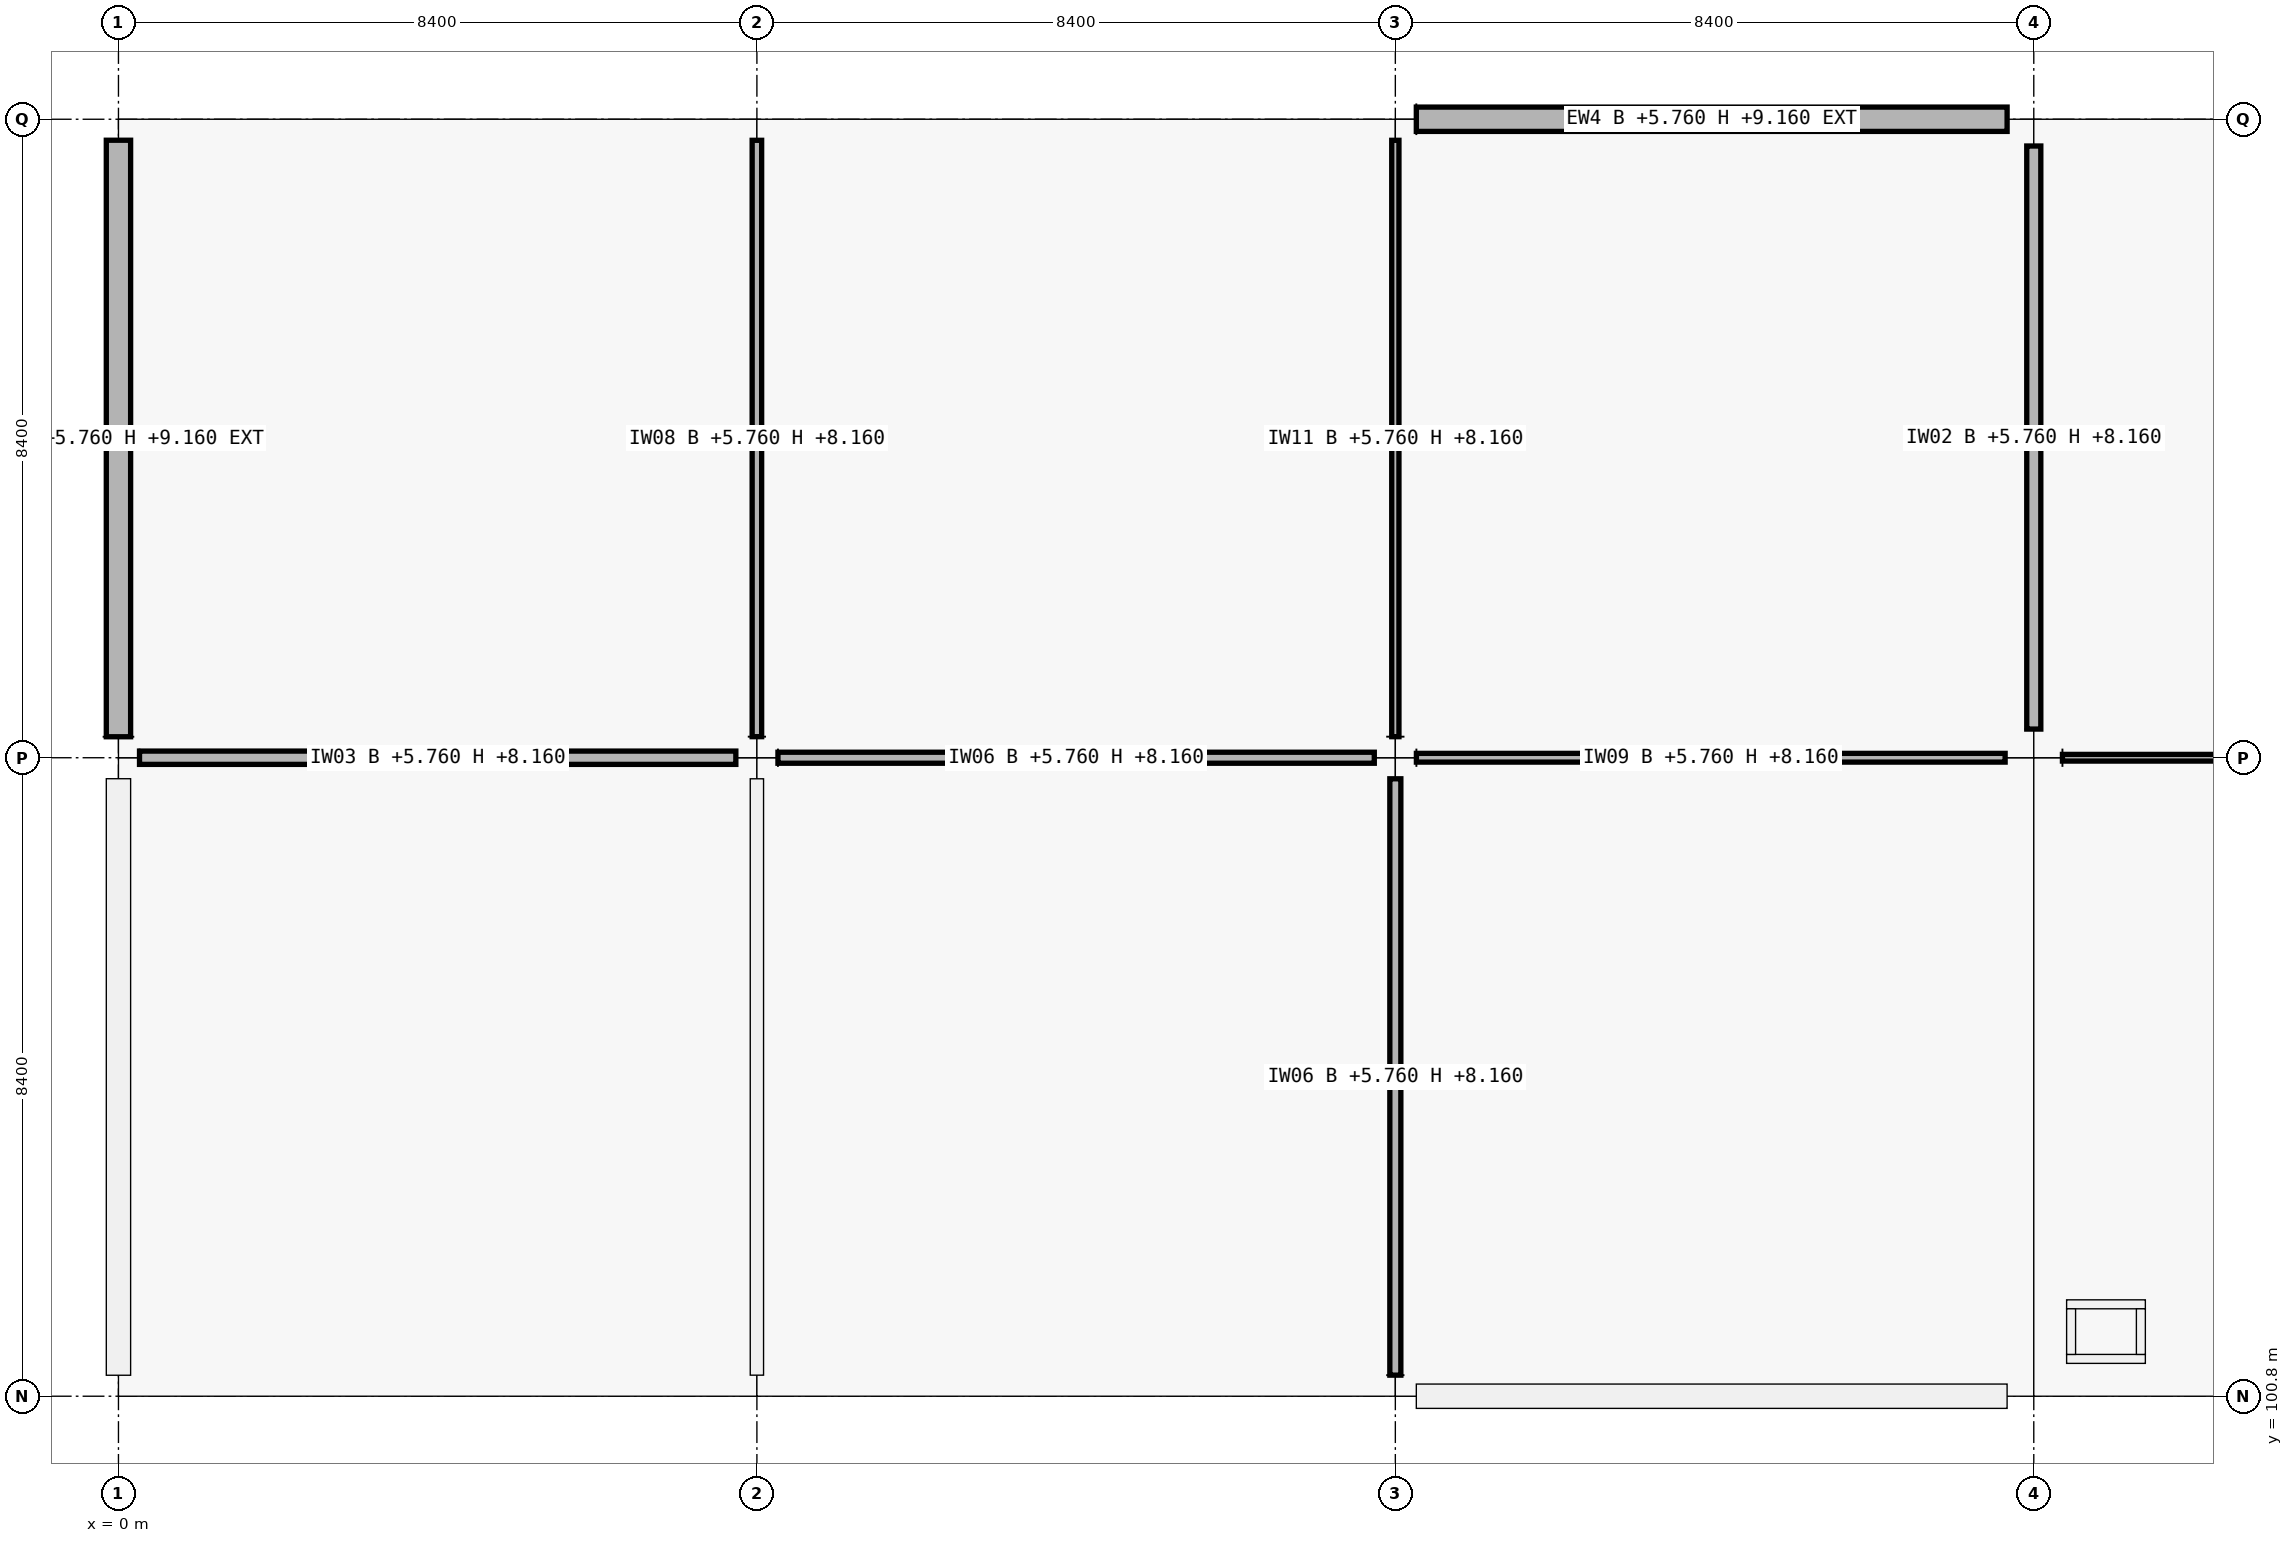
"""IFC4 building model, lengths in metres.
Left out: names, types, materials, properties, quantities, classifications, styles, units other than length and angle.
Written with IfcOpenShell. Run it as: python <this file> out.ifc"""

import sys

from ifc_helpers import new_model, si_unit, direction, frame, frame_2d, origin, origin_2d, place, context, subcontext, project, spatial, rectangle, extrude, element, fill, save


model = new_model("IFC4")
c1 = context("Model", 3, precision=1e-05, world=origin(), true_north=direction((0.0, 1.0)))
c2 = subcontext(c1, "Body", "Model", "MODEL_VIEW")
j1 = project(units=[si_unit("LENGTHUNIT", "METRE"), si_unit("PLANEANGLEUNIT", "RADIAN")], contexts=[c1])
p1 = place(None, origin())
s1 = spatial("IfcSite", under=j1, at=p1, CompositionType="ELEMENT")
p2 = place(p1, origin())
s2 = spatial("IfcBuilding", under=s1, at=p2, CompositionType="ELEMENT")
p3 = place(p2, frame((0.0, 0.0, 5.76)))
s3 = spatial("IfcBuildingStorey", under=s2, at=p3, CompositionType="ELEMENT", Elevation=5.76)
for number, where, z_axis, x_axis in (
    (1, (0.0, 100.8, 0.0), (0.0, 0.0, 1.0), (1.0, 0.0, 0.0)),
    (2, (0.0, 109.2, 0.0), (0.0, 0.0, 1.0), (1.0, 0.0, 0.0)),
    (3, (0.0, 117.6, 0.0), (0.0, 0.0, 1.0), (1.0, 0.0, 0.0)),
    (4, (8.4, 100.8, 0.0), (0.0, 0.0, 1.0), (1.0, 0.0, 0.0)),
    (5, (8.4, 109.2, 0.0), (0.0, 0.0, 1.0), (1.0, 0.0, 0.0)),
    (6, (8.4, 117.6, 0.0), (0.0, 0.0, 1.0), (1.0, 0.0, 0.0)),
    (7, (16.8, 100.8, 0.0), (0.0, 0.0, 1.0), (1.0, 0.0, 0.0)),
    (8, (16.8, 109.2, 0.0), (0.0, 0.0, 1.0), (1.0, 0.0, 0.0)),
    (9, (16.8, 117.6, 0.0), (0.0, 0.0, 1.0), (1.0, 0.0, 0.0)),
):
    element("IfcColumn", number, at=place(p3, frame(where, z_axis=z_axis, x_axis=x_axis)), inside=s3, PredefinedType="COLUMN", context=c2, shape_type="SweptSolid", body=[
        extrude(rectangle(XDim=0.55, YDim=0.55, at=origin_2d()), origin(), (0.0, 0.0, 1.0), 4.2),
    ])
p4 = place(p3, frame((25.2, 100.8, 0.0), z_axis=(0.0, 0.0, 1.0), x_axis=(1.0, 0.0, 0.0)))
e10 = element("IfcColumn", 10, at=p4, inside=s3, PredefinedType="COLUMN", context=c2, shape_type="SweptSolid", body=[
    extrude(rectangle(XDim=0.7, YDim=0.7, at=origin_2d()), origin(), (0.0, 0.0, 1.0), 4.5),
])
p5 = place(p3, frame((25.2, 109.2, 0.0), z_axis=(0.0, 0.0, 1.0), x_axis=(1.0, 0.0, 0.0)))
e11 = element("IfcColumn", 11, at=p5, inside=s3, PredefinedType="COLUMN", context=c2, shape_type="SweptSolid", body=[
    extrude(rectangle(XDim=0.75, YDim=0.75, at=origin_2d()), origin(), (0.0, 0.0, 1.0), 4.5),
])
p6 = place(p3, frame((25.2, 117.6, 0.0), z_axis=(0.0, 0.0, 1.0), x_axis=(1.0, 0.0, 0.0)))
e12 = element("IfcColumn", 12, at=p6, inside=s3, PredefinedType="COLUMN", context=c2, shape_type="SweptSolid", body=[
    extrude(rectangle(XDim=0.7, YDim=0.7, at=origin_2d()), origin(), (0.0, 0.0, 1.0), 4.5),
])
p7 = place(p3, frame((0.0, 101.076, 0.0), z_axis=(0.0, 0.0, 1.0), x_axis=(0.0, 1.0, 0.0)))
e13 = element("IfcWall", 13, at=p7, inside=s3, PredefinedType="SOLIDWALL", context=c2, shape_type="SweptSolid", body=[
    extrude(rectangle(XDim=7.848, YDim=0.32, at=frame_2d((3.924, 0.0))), origin(), (0.0, 0.0, 1.0), 3.4),
])
p8 = place(p7, frame((3.124, 0.0, 0.9)))
e14 = element("IfcOpeningElement", 14, at=p8, cuts=e13, PredefinedType="OPENING", context=c2, shape_type="SweptSolid", body=[
    extrude(rectangle(XDim=1.6, YDim=2.25, at=frame_2d((0.8, 1.125))), frame((0.0, 0.16, 0.0), z_axis=(0.0, -1.0, 0.0), x_axis=(1.0, 0.0, 0.0)), (0.0, 0.0, 1.0), 0.32),
])
p9 = place(p3, frame((0.0, 109.476, 0.0), z_axis=(0.0, 0.0, 1.0), x_axis=(0.0, 1.0, 0.0)))
e15 = element("IfcWall", 15, at=p9, inside=s3, PredefinedType="SOLIDWALL", context=c2, shape_type="SweptSolid", body=[
    extrude(rectangle(XDim=7.848, YDim=0.32, at=frame_2d((3.924, 0.0))), origin(), (0.0, 0.0, 1.0), 3.4),
])
p10 = place(p3, frame((24.849, 100.8, 0.0), z_axis=(0.0, 0.0, 1.0), x_axis=(-1.0, 0.0, 0.0)))
e16 = element("IfcWall", 16, at=p10, inside=s3, PredefinedType="SOLIDWALL", context=c2, shape_type="SweptSolid", body=[
    extrude(rectangle(XDim=7.773, YDim=0.32, at=frame_2d((3.887, 0.0))), origin(), (0.0, 0.0, 1.0), 3.4),
])
p11 = place(p10, frame((3.436, 0.0, 0.9)))
e17 = element("IfcOpeningElement", 17, at=p11, cuts=e16, PredefinedType="OPENING", context=c2, shape_type="SweptSolid", body=[
    extrude(rectangle(XDim=0.9, YDim=1.5, at=frame_2d((0.45, 0.75))), frame((0.0, 0.16, 0.0), z_axis=(0.0, -1.0, 0.0), x_axis=(1.0, 0.0, 0.0)), (0.0, 0.0, 1.0), 0.32),
])
p12 = place(p3, frame((17.076, 117.6, 0.0), z_axis=(0.0, 0.0, 1.0), x_axis=(1.0, 0.0, 0.0)))
e18 = element("IfcWall", 18, at=p12, inside=s3, PredefinedType="SOLIDWALL", context=c2, shape_type="SweptSolid", body=[
    extrude(rectangle(XDim=7.773, YDim=0.32, at=frame_2d((3.887, 0.0))), origin(), (0.0, 0.0, 1.0), 3.4),
])
p13 = place(p12, frame((3.036, 0.0, 0.9)))
e19 = element("IfcOpeningElement", 19, at=p13, cuts=e18, PredefinedType="OPENING", context=c2, shape_type="SweptSolid", body=[
    extrude(rectangle(XDim=1.7, YDim=1.85, at=frame_2d((0.85, 0.925))), frame((0.0, 0.16, 0.0), z_axis=(0.0, -1.0, 0.0), x_axis=(1.0, 0.0, 0.0)), (0.0, 0.0, 1.0), 0.32),
])
for number, where, z_axis, x_axis in (
    (20, (25.632, 101.291, 0.0), (0.0, 0.0, 1.0), (1.0, 0.0, 0.0)),
    (21, (25.632, 102.009, 0.0), (0.0, 0.0, 1.0), (1.0, 0.0, 0.0)),
):
    element("IfcWall", number, at=place(p3, frame(where, z_axis=z_axis, x_axis=x_axis)), inside=s3, PredefinedType="PARTITIONING", context=c2, shape_type="SweptSolid", body=[
        extrude(rectangle(XDim=1.036, YDim=0.118, at=frame_2d((0.518, 0.0))), origin(), (0.0, 0.0, 1.0), 3.48),
    ])
for number, where, z_axis, x_axis in (
    (22, (25.691, 101.35, 0.0), (0.0, 0.0, 1.0), (0.0, 1.0, 0.0)),
    (23, (26.609, 101.35, 0.0), (0.0, 0.0, 1.0), (0.0, 1.0, 0.0)),
):
    element("IfcWall", number, at=place(p3, frame(where, z_axis=z_axis, x_axis=x_axis)), inside=s3, PredefinedType="PARTITIONING", context=c2, shape_type="SweptSolid", body=[
        extrude(rectangle(XDim=0.6, YDim=0.118, at=frame_2d((0.3, 0.0))), origin(), (0.0, 0.0, 1.0), 3.48),
    ])
p14 = place(p3, frame((0.277, 109.2, 0.0), z_axis=(0.0, 0.0, 1.0), x_axis=(1.0, 0.0, 0.0)))
e24 = element("IfcWall", 24, at=p14, inside=s3, PredefinedType="PARTITIONING", context=c2, shape_type="SweptSolid", body=[
    extrude(rectangle(XDim=7.846, YDim=0.175, at=frame_2d((3.923, 0.0))), origin(), (0.0, 0.0, 1.0), 2.4),
])
p15 = place(p14, frame((3.443, 0.0, 0.0)))
e25 = element("IfcOpeningElement", 25, at=p15, cuts=e24, PredefinedType="OPENING", context=c2, shape_type="SweptSolid", body=[
    extrude(rectangle(XDim=0.96, YDim=2.18, at=frame_2d((0.48, 1.09))), frame((0.0, 0.087, 0.0), z_axis=(0.0, -1.0, 0.0), x_axis=(1.0, 0.0, 0.0)), (0.0, 0.0, 1.0), 0.175),
])
p16 = place(p3, frame((8.677, 109.2, 0.0), z_axis=(0.0, 0.0, 1.0), x_axis=(1.0, 0.0, 0.0)))
e26 = element("IfcWall", 26, at=p16, inside=s3, PredefinedType="PARTITIONING", context=c2, shape_type="SweptSolid", body=[
    extrude(rectangle(XDim=7.846, YDim=0.145, at=frame_2d((3.923, 0.0))), origin(), (0.0, 0.0, 1.0), 2.4),
])
p17 = place(p16, frame((3.463, 0.0, 0.0)))
e27 = element("IfcOpeningElement", 27, at=p17, cuts=e26, PredefinedType="OPENING", context=c2, shape_type="SweptSolid", body=[
    extrude(rectangle(XDim=0.92, YDim=2.15, at=frame_2d((0.46, 1.075))), frame((0.0, 0.073, 0.0), z_axis=(0.0, -1.0, 0.0), x_axis=(1.0, 0.0, 0.0)), (0.0, 0.0, 1.0), 0.145),
])
p18 = place(p3, frame((17.077, 109.2, 0.0), z_axis=(0.0, 0.0, 1.0), x_axis=(1.0, 0.0, 0.0)))
e28 = element("IfcWall", 28, at=p18, inside=s3, PredefinedType="PARTITIONING", context=c2, shape_type="SweptSolid", body=[
    extrude(rectangle(XDim=7.746, YDim=0.115, at=frame_2d((3.873, 0.0))), origin(), (0.0, 0.0, 1.0), 2.4),
])
p19 = place(p18, frame((3.368, 0.0, 0.0)))
e29 = element("IfcOpeningElement", 29, at=p19, cuts=e28, PredefinedType="OPENING", context=c2, shape_type="SweptSolid", body=[
    extrude(rectangle(XDim=1.01, YDim=2.12, at=frame_2d((0.505, 1.06))), frame((0.0, 0.058, 0.0), z_axis=(0.0, -1.0, 0.0), x_axis=(1.0, 0.0, 0.0)), (0.0, 0.0, 1.0), 0.115),
])
p20 = place(p3, frame((25.577, 109.2, 0.0), z_axis=(0.0, 0.0, 1.0), x_axis=(1.0, 0.0, 0.0)))
e30 = element("IfcWall", 30, at=p20, inside=s3, PredefinedType="PARTITIONING", context=c2, shape_type="SweptSolid", body=[
    extrude(rectangle(XDim=7.671, YDim=0.088, at=frame_2d((3.835, 0.0))), origin(), (0.0, 0.0, 1.0), 2.4),
])
p21 = place(p20, frame((3.351, 0.0, 0.0)))
e31 = element("IfcOpeningElement", 31, at=p21, cuts=e30, PredefinedType="OPENING", context=c2, shape_type="SweptSolid", body=[
    extrude(rectangle(XDim=0.97, YDim=2.12, at=frame_2d((0.485, 1.06))), frame((0.0, 0.044, 0.0), z_axis=(0.0, -1.0, 0.0), x_axis=(1.0, 0.0, 0.0)), (0.0, 0.0, 1.0), 0.088),
])
p22 = place(p3, frame((8.4, 101.077, 0.0), z_axis=(0.0, 0.0, 1.0), x_axis=(0.0, 1.0, 0.0)))
e32 = element("IfcWall", 32, at=p22, inside=s3, PredefinedType="PARTITIONING", context=c2, shape_type="SweptSolid", body=[
    extrude(rectangle(XDim=7.846, YDim=0.175, at=frame_2d((3.923, 0.0))), origin(), (0.0, 0.0, 1.0), 2.4),
])
p23 = place(p22, frame((3.433, 0.0, 0.0)))
e33 = element("IfcOpeningElement", 33, at=p23, cuts=e32, PredefinedType="OPENING", context=c2, shape_type="SweptSolid", body=[
    extrude(rectangle(XDim=0.98, YDim=2.18, at=frame_2d((0.49, 1.09))), frame((0.0, 0.087, 0.0), z_axis=(0.0, -1.0, 0.0), x_axis=(1.0, 0.0, 0.0)), (0.0, 0.0, 1.0), 0.175),
])
p24 = place(p3, frame((8.4, 109.477, 0.0), z_axis=(0.0, 0.0, 1.0), x_axis=(0.0, 1.0, 0.0)))
e34 = element("IfcWall", 34, at=p24, inside=s3, PredefinedType="PARTITIONING", context=c2, shape_type="SweptSolid", body=[
    extrude(rectangle(XDim=7.846, YDim=0.125, at=frame_2d((3.923, 0.0))), origin(), (0.0, 0.0, 1.0), 2.4),
])
p25 = place(p24, frame((3.453, 0.0, 0.0)))
e35 = element("IfcOpeningElement", 35, at=p25, cuts=e34, PredefinedType="OPENING", context=c2, shape_type="SweptSolid", body=[
    extrude(rectangle(XDim=0.94, YDim=2.15, at=frame_2d((0.47, 1.075))), frame((0.0, 0.062, 0.0), z_axis=(0.0, -1.0, 0.0), x_axis=(1.0, 0.0, 0.0)), (0.0, 0.0, 1.0), 0.125),
])
p26 = place(p3, frame((16.8, 101.077, 0.0), z_axis=(0.0, 0.0, 1.0), x_axis=(0.0, 1.0, 0.0)))
e36 = element("IfcWall", 36, at=p26, inside=s3, PredefinedType="PARTITIONING", context=c2, shape_type="SweptSolid", body=[
    extrude(rectangle(XDim=7.846, YDim=0.145, at=frame_2d((3.923, 0.0))), origin(), (0.0, 0.0, 1.0), 2.4),
])
p27 = place(p26, frame((3.383, 0.0, 0.0)))
e37 = element("IfcOpeningElement", 37, at=p27, cuts=e36, PredefinedType="OPENING", context=c2, shape_type="SweptSolid", body=[
    extrude(rectangle(XDim=1.08, YDim=2.22, at=frame_2d((0.54, 1.11))), frame((0.0, 0.073, 0.0), z_axis=(0.0, -1.0, 0.0), x_axis=(1.0, 0.0, 0.0)), (0.0, 0.0, 1.0), 0.145),
])
p28 = place(p3, frame((16.8, 109.477, 0.0), z_axis=(0.0, 0.0, 1.0), x_axis=(0.0, 1.0, 0.0)))
e38 = element("IfcWall", 38, at=p28, inside=s3, PredefinedType="PARTITIONING", context=c2, shape_type="SweptSolid", body=[
    extrude(rectangle(XDim=7.846, YDim=0.095, at=frame_2d((3.923, 0.0))), origin(), (0.0, 0.0, 1.0), 2.4),
])
p29 = place(p28, frame((3.458, 0.0, 0.0)))
e39 = element("IfcOpeningElement", 39, at=p29, cuts=e38, PredefinedType="OPENING", context=c2, shape_type="SweptSolid", body=[
    extrude(rectangle(XDim=0.93, YDim=2.12, at=frame_2d((0.465, 1.06))), frame((0.0, 0.047, 0.0), z_axis=(0.0, -1.0, 0.0), x_axis=(1.0, 0.0, 0.0)), (0.0, 0.0, 1.0), 0.095),
])
p30 = place(p3, frame((25.2, 109.577, 0.0), z_axis=(0.0, 0.0, 1.0), x_axis=(0.0, 1.0, 0.0)))
e40 = element("IfcWall", 40, at=p30, inside=s3, PredefinedType="PARTITIONING", context=c2, shape_type="SweptSolid", body=[
    extrude(rectangle(XDim=7.671, YDim=0.185, at=frame_2d((3.835, 0.0))), origin(), (0.0, 0.0, 1.0), 2.4),
])
p31 = place(p30, frame((3.336, 0.0, 0.0)))
e41 = element("IfcOpeningElement", 41, at=p31, cuts=e40, PredefinedType="OPENING", context=c2, shape_type="SweptSolid", body=[
    extrude(rectangle(XDim=1.0, YDim=2.2, at=frame_2d((0.5, 1.1))), frame((0.0, 0.093, 0.0), z_axis=(0.0, -1.0, 0.0), x_axis=(1.0, 0.0, 0.0)), (0.0, 0.0, 1.0), 0.185),
])
p32 = place(p8, origin())
e42 = element("IfcWindow", 42, at=p32, inside=s3, PartitioningType="SINGLE_PANEL", PredefinedType="WINDOW", context=c2, shape_type="SweptSolid", body=[
    extrude(rectangle(XDim=1.6, YDim=2.25, at=frame_2d((0.8, 1.125))), frame((0.0, 0.03, 0.0), z_axis=(0.0, -1.0, 0.0), x_axis=(1.0, 0.0, 0.0)), (0.0, 0.0, 1.0), 0.06),
])
fill(e14, e42)
p33 = place(p11, origin())
e43 = element("IfcWindow", 43, at=p33, inside=s3, PartitioningType="SINGLE_PANEL", PredefinedType="WINDOW", context=c2, shape_type="SweptSolid", body=[
    extrude(rectangle(XDim=0.9, YDim=1.5, at=frame_2d((0.45, 0.75))), frame((0.0, 0.03, 0.0), z_axis=(0.0, -1.0, 0.0), x_axis=(1.0, 0.0, 0.0)), (0.0, 0.0, 1.0), 0.06),
])
fill(e17, e43)
p34 = place(p13, origin())
e44 = element("IfcWindow", 44, at=p34, inside=s3, PartitioningType="SINGLE_PANEL", PredefinedType="WINDOW", context=c2, shape_type="SweptSolid", body=[
    extrude(rectangle(XDim=1.7, YDim=1.85, at=frame_2d((0.85, 0.925))), frame((0.0, 0.03, 0.0), z_axis=(0.0, -1.0, 0.0), x_axis=(1.0, 0.0, 0.0)), (0.0, 0.0, 1.0), 0.06),
])
fill(e19, e44)
p35 = place(p19, origin())
e45 = element("IfcDoor", 45, at=p35, inside=s3, OperationType="SINGLE_SWING_RIGHT", PredefinedType="DOOR", context=c2, shape_type="SweptSolid", body=[
    extrude(rectangle(XDim=1.01, YDim=2.12, at=frame_2d((0.505, 1.06))), frame((0.0, 0.025, 0.0), z_axis=(0.0, -1.0, 0.0), x_axis=(1.0, 0.0, 0.0)), (0.0, 0.0, 1.0), 0.05),
])
fill(e29, e45)
p36 = place(p27, origin())
e46 = element("IfcDoor", 46, at=p36, inside=s3, OperationType="SINGLE_SWING_RIGHT", PredefinedType="DOOR", context=c2, shape_type="SweptSolid", body=[
    extrude(rectangle(XDim=1.08, YDim=2.22, at=frame_2d((0.54, 1.11))), frame((0.0, 0.025, 0.0), z_axis=(0.0, -1.0, 0.0), x_axis=(1.0, 0.0, 0.0)), (0.0, 0.0, 1.0), 0.05),
])
fill(e37, e46)
p37 = place(p15, origin())
e47 = element("IfcDoor", 47, at=p37, inside=s3, OperationType="SINGLE_SWING_LEFT", PredefinedType="DOOR", context=c2, shape_type="SweptSolid", body=[
    extrude(rectangle(XDim=0.96, YDim=2.18, at=frame_2d((0.48, 1.09))), frame((0.0, 0.025, 0.0), z_axis=(0.0, -1.0, 0.0), x_axis=(1.0, 0.0, 0.0)), (0.0, 0.0, 1.0), 0.05),
])
fill(e25, e47)
p38 = place(p17, origin())
e48 = element("IfcDoor", 48, at=p38, inside=s3, OperationType="SINGLE_SWING_LEFT", PredefinedType="DOOR", context=c2, shape_type="SweptSolid", body=[
    extrude(rectangle(XDim=0.92, YDim=2.15, at=frame_2d((0.46, 1.075))), frame((0.0, 0.025, 0.0), z_axis=(0.0, -1.0, 0.0), x_axis=(1.0, 0.0, 0.0)), (0.0, 0.0, 1.0), 0.05),
])
fill(e27, e48)
p39 = place(p23, origin())
e49 = element("IfcDoor", 49, at=p39, inside=s3, OperationType="SINGLE_SWING_LEFT", PredefinedType="DOOR", context=c2, shape_type="SweptSolid", body=[
    extrude(rectangle(XDim=0.98, YDim=2.18, at=frame_2d((0.49, 1.09))), frame((0.0, 0.025, 0.0), z_axis=(0.0, -1.0, 0.0), x_axis=(1.0, 0.0, 0.0)), (0.0, 0.0, 1.0), 0.05),
])
fill(e33, e49)
p40 = place(p25, origin())
e50 = element("IfcDoor", 50, at=p40, inside=s3, OperationType="SINGLE_SWING_RIGHT", PredefinedType="DOOR", context=c2, shape_type="SweptSolid", body=[
    extrude(rectangle(XDim=0.94, YDim=2.15, at=frame_2d((0.47, 1.075))), frame((0.0, 0.025, 0.0), z_axis=(0.0, -1.0, 0.0), x_axis=(1.0, 0.0, 0.0)), (0.0, 0.0, 1.0), 0.05),
])
fill(e35, e50)
p41 = place(p29, origin())
e51 = element("IfcDoor", 51, at=p41, inside=s3, OperationType="SINGLE_SWING_LEFT", PredefinedType="DOOR", context=c2, shape_type="SweptSolid", body=[
    extrude(rectangle(XDim=0.93, YDim=2.12, at=frame_2d((0.465, 1.06))), frame((0.0, 0.025, 0.0), z_axis=(0.0, -1.0, 0.0), x_axis=(1.0, 0.0, 0.0)), (0.0, 0.0, 1.0), 0.05),
])
fill(e39, e51)
p42 = place(p31, origin())
e52 = element("IfcDoor", 52, at=p42, inside=s3, OperationType="SINGLE_SWING_RIGHT", PredefinedType="DOOR", context=c2, shape_type="SweptSolid", body=[
    extrude(rectangle(XDim=1.0, YDim=2.2, at=frame_2d((0.5, 1.1))), frame((0.0, 0.025, 0.0), z_axis=(0.0, -1.0, 0.0), x_axis=(1.0, 0.0, 0.0)), (0.0, 0.0, 1.0), 0.05),
])
fill(e41, e52)
save(model, sys.argv[1])
